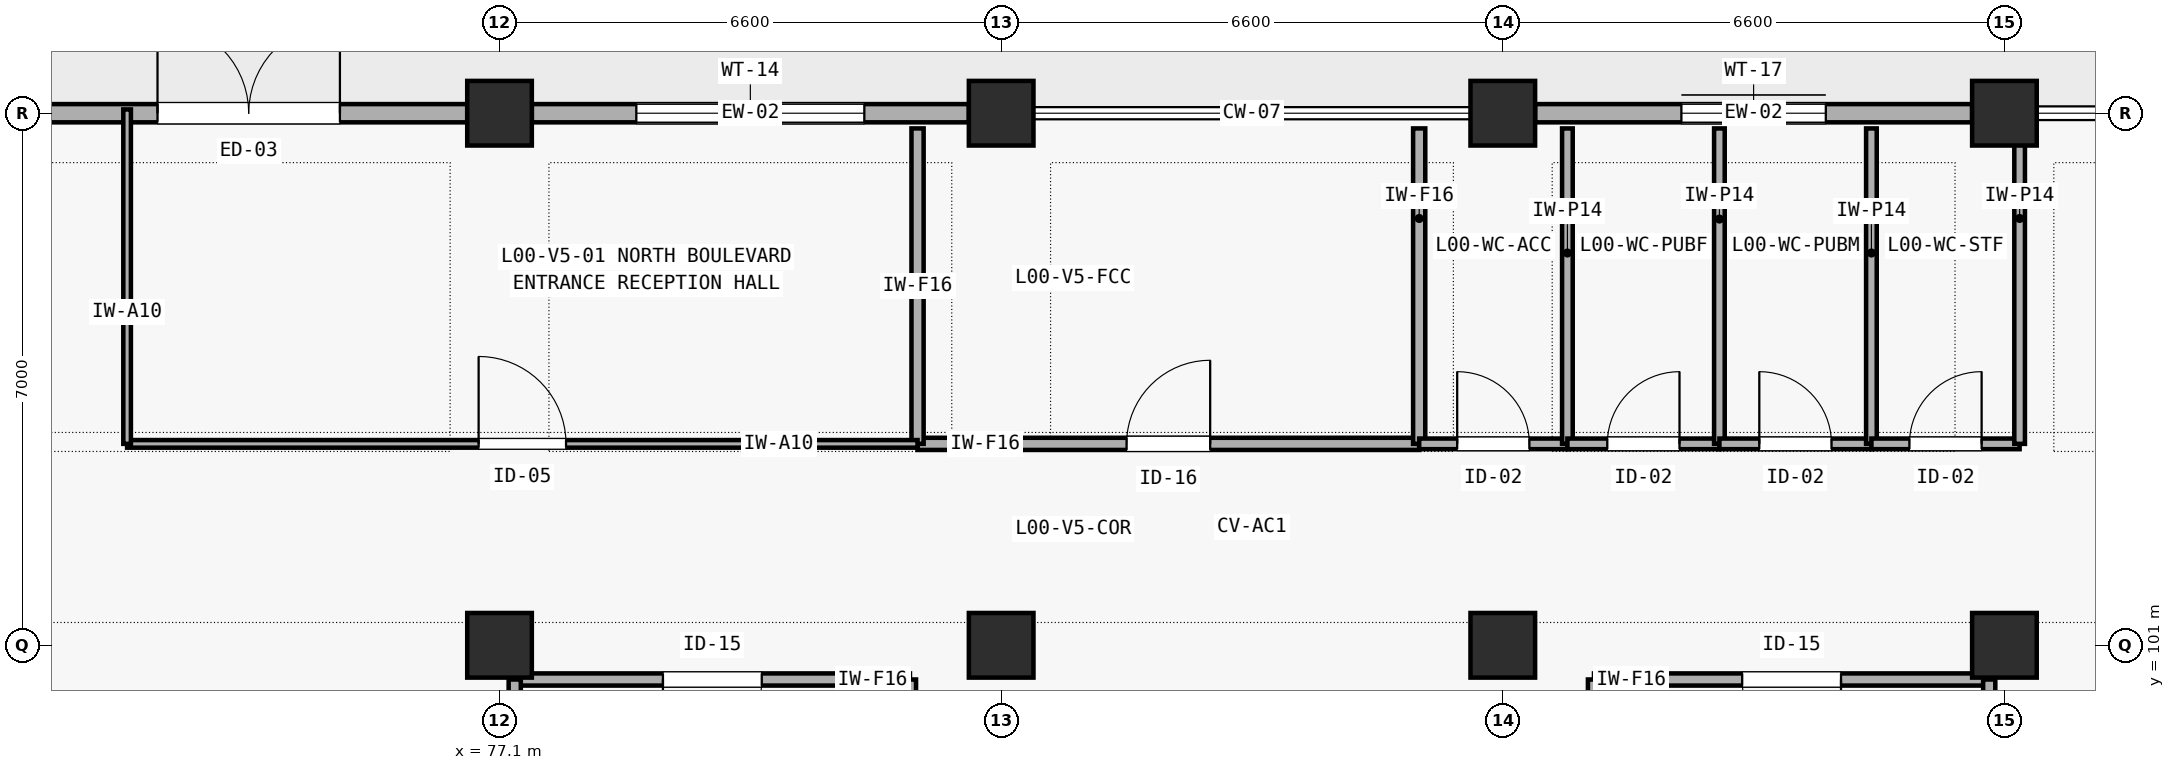
"""IFC4 building model, lengths in metres.
Left out: names, types, materials, properties, quantities, classifications, styles, units other than length and angle.
Written with IfcOpenShell. Run it as: python <this file> out.ifc"""

import sys

from ifc_helpers import new_model, si_unit, direction, frame, frame_2d, origin, origin_2d, place, context, subcontext, project, spatial, rectangle, extrude, element, fill, save


model = new_model("IFC4")
c1 = context("Model", 3, precision=1e-05, world=origin(), true_north=direction((0.0, 1.0)))
c2 = subcontext(c1, "Body", "Model", "MODEL_VIEW")
j1 = project(units=[si_unit("LENGTHUNIT", "METRE"), si_unit("PLANEANGLEUNIT", "RADIAN")], contexts=[c1])
p1 = place(None, origin())
s1 = spatial("IfcSite", under=j1, at=p1, CompositionType="ELEMENT")
p2 = place(p1, origin())
s2 = spatial("IfcBuilding", under=s1, at=p2, CompositionType="ELEMENT")
p3 = place(p2, origin())
s3 = spatial("IfcBuildingStorey", under=s2, at=p3, CompositionType="ELEMENT", Elevation=0.0)
for number, where, z_axis, x_axis in (
    (1, (77.1, 101.0, 0.0), (0.0, 0.0, 1.0), (1.0, 0.0, 0.0)),
    (2, (77.1, 108.0, 0.0), (0.0, 0.0, 1.0), (1.0, 0.0, 0.0)),
    (3, (83.7, 101.0, 0.0), (0.0, 0.0, 1.0), (1.0, 0.0, 0.0)),
    (4, (83.7, 108.0, 0.0), (0.0, 0.0, 1.0), (1.0, 0.0, 0.0)),
    (5, (90.3, 101.0, 0.0), (0.0, 0.0, 1.0), (1.0, 0.0, 0.0)),
    (6, (90.3, 108.0, 0.0), (0.0, 0.0, 1.0), (1.0, 0.0, 0.0)),
    (7, (96.9, 101.0, 0.0), (0.0, 0.0, 1.0), (1.0, 0.0, 0.0)),
    (8, (96.9, 108.0, 0.0), (0.0, 0.0, 1.0), (1.0, 0.0, 0.0)),
):
    element("IfcColumn", number, at=place(p3, frame(where, z_axis=z_axis, x_axis=x_axis)), inside=s3, PredefinedType="COLUMN", context=c2, shape_type="SweptSolid", body=[
        extrude(rectangle(XDim=0.85, YDim=0.85, at=origin_2d()), origin(), (0.0, 0.0, 1.0), 4.2),
    ])
p4 = place(p3, frame((70.925, 108.0, 0.0), z_axis=(0.0, 0.0, 1.0), x_axis=(1.0, 0.0, 0.0)))
e9 = element("IfcWall", 9, at=p4, inside=s3, PredefinedType="SOLIDWALL", context=c2, shape_type="SweptSolid", body=[
    extrude(rectangle(XDim=5.75, YDim=0.24, at=frame_2d((2.875, 0.0))), origin(), (0.0, 0.0, 1.0), 3.345),
])
p5 = place(p4, frame((1.675, 0.0, 0.0)))
e10 = element("IfcOpeningElement", 10, at=p5, cuts=e9, PredefinedType="OPENING", context=c2, shape_type="SweptSolid", body=[
    extrude(rectangle(XDim=2.4, YDim=2.25, at=frame_2d((1.2, 1.125))), frame((0.0, 0.13, 0.0), z_axis=(0.0, -1.0, 0.0), x_axis=(1.0, 0.0, 0.0)), (0.0, 0.0, 1.0), 0.26),
])
p6 = place(p3, frame((77.525, 108.0, 0.0), z_axis=(0.0, 0.0, 1.0), x_axis=(1.0, 0.0, 0.0)))
e11 = element("IfcWall", 11, at=p6, inside=s3, PredefinedType="SOLIDWALL", context=c2, shape_type="SweptSolid", body=[
    extrude(rectangle(XDim=5.75, YDim=0.24, at=frame_2d((2.875, 0.0))), origin(), (0.0, 0.0, 1.0), 3.135),
])
p7 = place(p6, frame((1.375, 0.0, 0.85)))
e12 = element("IfcOpeningElement", 12, at=p7, cuts=e11, PredefinedType="OPENING", context=c2, shape_type="SweptSolid", body=[
    extrude(rectangle(XDim=3.0, YDim=1.5, at=frame_2d((1.5, 0.75))), frame((0.0, 0.13, 0.0), z_axis=(0.0, -1.0, 0.0), x_axis=(1.0, 0.0, 0.0)), (0.0, 0.0, 1.0), 0.26),
])
p8 = place(p3, frame((90.725, 108.0, 0.0), z_axis=(0.0, 0.0, 1.0), x_axis=(1.0, 0.0, 0.0)))
e13 = element("IfcWall", 13, at=p8, inside=s3, PredefinedType="SOLIDWALL", context=c2, shape_type="SweptSolid", body=[
    extrude(rectangle(XDim=5.75, YDim=0.24, at=frame_2d((2.875, 0.0))), origin(), (0.0, 0.0, 1.0), 3.235),
])
p9 = place(p8, frame((1.925, 0.0, 0.85)))
e14 = element("IfcOpeningElement", 14, at=p9, cuts=e13, PredefinedType="OPENING", context=c2, shape_type="SweptSolid", body=[
    extrude(rectangle(XDim=1.9, YDim=1.25, at=frame_2d((0.95, 0.625))), frame((0.0, 0.13, 0.0), z_axis=(0.0, -1.0, 0.0), x_axis=(1.0, 0.0, 0.0)), (0.0, 0.0, 1.0), 0.26),
])
p10 = place(p3, frame((77.3, 100.55, 0.0), z_axis=(0.0, 0.0, 1.0), x_axis=(1.0, 0.0, 0.0)))
e15 = element("IfcWall", 15, at=p10, inside=s3, PredefinedType="SOLIDWALL", context=c2, shape_type="SweptSolid", body=[
    extrude(rectangle(XDim=5.2, YDim=0.16, at=frame_2d((2.6, 0.0))), origin(), (0.0, 0.0, 1.0), 3.9),
])
p11 = place(p10, frame((1.95, 0.0, 0.0)))
e16 = element("IfcOpeningElement", 16, at=p11, cuts=e15, PredefinedType="OPENING", context=c2, shape_type="SweptSolid", body=[
    extrude(rectangle(XDim=1.3, YDim=2.15, at=frame_2d((0.65, 1.075))), frame((0.0, 0.09, 0.0), z_axis=(0.0, -1.0, 0.0), x_axis=(1.0, 0.0, 0.0)), (0.0, 0.0, 1.0), 0.18),
])
p12 = place(p3, frame((77.3, 97.5, 0.0), z_axis=(0.0, 0.0, 1.0), x_axis=(0.0, 1.0, 0.0)))
e17 = element("IfcWall", 17, at=p12, inside=s3, PredefinedType="SOLIDWALL", context=c2, shape_type="SweptSolid", body=[
    extrude(rectangle(XDim=3.05, YDim=0.16, at=frame_2d((1.525, 0.0))), origin(), (0.0, 0.0, 1.0), 3.405),
])
p13 = place(p3, frame((82.5, 97.5, 0.0), z_axis=(0.0, 0.0, 1.0), x_axis=(0.0, 1.0, 0.0)))
e18 = element("IfcWall", 18, at=p13, inside=s3, PredefinedType="SOLIDWALL", context=c2, shape_type="SweptSolid", body=[
    extrude(rectangle(XDim=3.05, YDim=0.16, at=frame_2d((1.525, 0.0))), origin(), (0.0, 0.0, 1.0), 3.9),
])
p14 = place(p3, frame((91.5, 100.55, 0.0), z_axis=(0.0, 0.0, 1.0), x_axis=(1.0, 0.0, 0.0)))
e19 = element("IfcWall", 19, at=p14, inside=s3, PredefinedType="SOLIDWALL", context=c2, shape_type="SweptSolid", body=[
    extrude(rectangle(XDim=5.2, YDim=0.16, at=frame_2d((2.6, 0.0))), origin(), (0.0, 0.0, 1.0), 3.9),
])
p15 = place(p14, frame((1.95, 0.0, 0.0)))
e20 = element("IfcOpeningElement", 20, at=p15, cuts=e19, PredefinedType="OPENING", context=c2, shape_type="SweptSolid", body=[
    extrude(rectangle(XDim=1.3, YDim=2.15, at=frame_2d((0.65, 1.075))), frame((0.0, 0.09, 0.0), z_axis=(0.0, -1.0, 0.0), x_axis=(1.0, 0.0, 0.0)), (0.0, 0.0, 1.0), 0.18),
])
p16 = place(p3, frame((91.5, 97.5, 0.0), z_axis=(0.0, 0.0, 1.0), x_axis=(0.0, 1.0, 0.0)))
e21 = element("IfcWall", 21, at=p16, inside=s3, PredefinedType="SOLIDWALL", context=c2, shape_type="SweptSolid", body=[
    extrude(rectangle(XDim=3.05, YDim=0.16, at=frame_2d((1.525, 0.0))), origin(), (0.0, 0.0, 1.0), 3.9),
])
p17 = place(p3, frame((96.7, 97.5, 0.0), z_axis=(0.0, 0.0, 1.0), x_axis=(0.0, 1.0, 0.0)))
e22 = element("IfcWall", 22, at=p17, inside=s3, PredefinedType="SOLIDWALL", context=c2, shape_type="SweptSolid", body=[
    extrude(rectangle(XDim=3.05, YDim=0.16, at=frame_2d((1.525, 0.0))), origin(), (0.0, 0.0, 1.0), 3.405),
])
p18 = place(p3, frame((82.6, 103.65, 0.0), z_axis=(0.0, 0.0, 1.0), x_axis=(1.0, 0.0, 0.0)))
e23 = element("IfcWall", 23, at=p18, inside=s3, PredefinedType="SOLIDWALL", context=c2, shape_type="SweptSolid", body=[
    extrude(rectangle(XDim=6.6, YDim=0.16, at=frame_2d((3.3, 0.0))), origin(), (0.0, 0.0, 1.0), 3.9),
])
p19 = place(p18, frame((2.75, 0.0, 0.0)))
e24 = element("IfcOpeningElement", 24, at=p19, cuts=e23, PredefinedType="OPENING", context=c2, shape_type="SweptSolid", body=[
    extrude(rectangle(XDim=1.1, YDim=2.2, at=frame_2d((0.55, 1.1))), frame((0.0, 0.09, 0.0), z_axis=(0.0, -1.0, 0.0), x_axis=(1.0, 0.0, 0.0)), (0.0, 0.0, 1.0), 0.18),
])
for number, where, z_axis, x_axis in (
    (25, (82.6, 103.65, 0.0), (0.0, 0.0, 1.0), (0.0, 1.0, 0.0)),
    (26, (89.2, 103.65, 0.0), (0.0, 0.0, 1.0), (0.0, 1.0, 0.0)),
):
    element("IfcWall", number, at=place(p3, frame(where, z_axis=z_axis, x_axis=x_axis)), inside=s3, PredefinedType="SOLIDWALL", context=c2, shape_type="SweptSolid", body=[
        extrude(rectangle(XDim=4.15, YDim=0.16, at=frame_2d((2.075, 0.0))), origin(), (0.0, 0.0, 1.0), 3.9),
    ])
p20 = place(p3, frame((89.2, 103.65, 0.0), z_axis=(0.0, 0.0, 1.0), x_axis=(1.0, 0.0, 0.0)))
e27 = element("IfcWall", 27, at=p20, inside=s3, PredefinedType="PLUMBINGWALL", context=c2, shape_type="SweptSolid", body=[
    extrude(rectangle(XDim=1.95, YDim=0.14, at=frame_2d((0.975, 0.0))), origin(), (0.0, 0.0, 1.0), 3.9),
])
p21 = place(p20, frame((0.5, 0.0, 0.0)))
e28 = element("IfcOpeningElement", 28, at=p21, cuts=e27, PredefinedType="OPENING", context=c2, shape_type="SweptSolid", body=[
    extrude(rectangle(XDim=0.95, YDim=2.1, at=frame_2d((0.475, 1.05))), frame((0.0, 0.08, 0.0), z_axis=(0.0, -1.0, 0.0), x_axis=(1.0, 0.0, 0.0)), (0.0, 0.0, 1.0), 0.16),
])
p22 = place(p3, frame((91.15, 103.65, 0.0), z_axis=(0.0, 0.0, 1.0), x_axis=(0.0, 1.0, 0.0)))
e29 = element("IfcWall", 29, at=p22, inside=s3, PredefinedType="PLUMBINGWALL", context=c2, shape_type="SweptSolid", body=[
    extrude(rectangle(XDim=4.15, YDim=0.14, at=frame_2d((2.075, 0.0))), origin(), (0.0, 0.0, 1.0), 3.9),
])
p23 = place(p3, frame((91.15, 103.65, 0.0), z_axis=(0.0, 0.0, 1.0), x_axis=(1.0, 0.0, 0.0)))
e30 = element("IfcWall", 30, at=p23, inside=s3, PredefinedType="PLUMBINGWALL", context=c2, shape_type="SweptSolid", body=[
    extrude(rectangle(XDim=2.0, YDim=0.14, at=frame_2d((1.0, 0.0))), origin(), (0.0, 0.0, 1.0), 3.9),
])
p24 = place(p23, frame((0.525, 0.0, 0.0)))
e31 = element("IfcOpeningElement", 31, at=p24, cuts=e30, PredefinedType="OPENING", context=c2, shape_type="SweptSolid", body=[
    extrude(rectangle(XDim=0.95, YDim=2.1, at=frame_2d((0.475, 1.05))), frame((0.0, 0.08, 0.0), z_axis=(0.0, -1.0, 0.0), x_axis=(1.0, 0.0, 0.0)), (0.0, 0.0, 1.0), 0.16),
])
p25 = place(p3, frame((93.15, 103.65, 0.0), z_axis=(0.0, 0.0, 1.0), x_axis=(0.0, 1.0, 0.0)))
e32 = element("IfcWall", 32, at=p25, inside=s3, PredefinedType="PLUMBINGWALL", context=c2, shape_type="SweptSolid", body=[
    extrude(rectangle(XDim=4.15, YDim=0.14, at=frame_2d((2.075, 0.0))), origin(), (0.0, 0.0, 1.0), 3.9),
])
p26 = place(p3, frame((93.15, 103.65, 0.0), z_axis=(0.0, 0.0, 1.0), x_axis=(1.0, 0.0, 0.0)))
e33 = element("IfcWall", 33, at=p26, inside=s3, PredefinedType="PLUMBINGWALL", context=c2, shape_type="SweptSolid", body=[
    extrude(rectangle(XDim=2.0, YDim=0.14, at=frame_2d((1.0, 0.0))), origin(), (0.0, 0.0, 1.0), 3.9),
])
p27 = place(p26, frame((0.525, 0.0, 0.0)))
e34 = element("IfcOpeningElement", 34, at=p27, cuts=e33, PredefinedType="OPENING", context=c2, shape_type="SweptSolid", body=[
    extrude(rectangle(XDim=0.95, YDim=2.1, at=frame_2d((0.475, 1.05))), frame((0.0, 0.08, 0.0), z_axis=(0.0, -1.0, 0.0), x_axis=(1.0, 0.0, 0.0)), (0.0, 0.0, 1.0), 0.16),
])
p28 = place(p3, frame((95.15, 103.65, 0.0), z_axis=(0.0, 0.0, 1.0), x_axis=(0.0, 1.0, 0.0)))
e35 = element("IfcWall", 35, at=p28, inside=s3, PredefinedType="PLUMBINGWALL", context=c2, shape_type="SweptSolid", body=[
    extrude(rectangle(XDim=4.15, YDim=0.14, at=frame_2d((2.075, 0.0))), origin(), (0.0, 0.0, 1.0), 3.9),
])
p29 = place(p3, frame((95.15, 103.65, 0.0), z_axis=(0.0, 0.0, 1.0), x_axis=(1.0, 0.0, 0.0)))
e36 = element("IfcWall", 36, at=p29, inside=s3, PredefinedType="PLUMBINGWALL", context=c2, shape_type="SweptSolid", body=[
    extrude(rectangle(XDim=1.95, YDim=0.14, at=frame_2d((0.975, 0.0))), origin(), (0.0, 0.0, 1.0), 3.9),
])
p30 = place(p29, frame((0.5, 0.0, 0.0)))
e37 = element("IfcOpeningElement", 37, at=p30, cuts=e36, PredefinedType="OPENING", context=c2, shape_type="SweptSolid", body=[
    extrude(rectangle(XDim=0.95, YDim=2.1, at=frame_2d((0.475, 1.05))), frame((0.0, 0.08, 0.0), z_axis=(0.0, -1.0, 0.0), x_axis=(1.0, 0.0, 0.0)), (0.0, 0.0, 1.0), 0.16),
])
p31 = place(p3, frame((97.1, 103.65, 0.0), z_axis=(0.0, 0.0, 1.0), x_axis=(0.0, 1.0, 0.0)))
e38 = element("IfcWall", 38, at=p31, inside=s3, PredefinedType="PLUMBINGWALL", context=c2, shape_type="SweptSolid", body=[
    extrude(rectangle(XDim=4.15, YDim=0.14, at=frame_2d((2.075, 0.0))), origin(), (0.0, 0.0, 1.0), 3.505),
])
p32 = place(p3, frame((72.2, 103.65, 0.0), z_axis=(0.0, 0.0, 1.0), x_axis=(1.0, 0.0, 0.0)))
e39 = element("IfcWall", 39, at=p32, inside=s3, PredefinedType="PARTITIONING", context=c2, shape_type="SweptSolid", body=[
    extrude(rectangle(XDim=10.4, YDim=0.1, at=frame_2d((5.2, 0.0))), origin(), (0.0, 0.0, 1.0), 3.9),
])
p33 = place(p32, frame((4.625, 0.0, 0.0)))
e40 = element("IfcOpeningElement", 40, at=p33, cuts=e39, PredefinedType="OPENING", context=c2, shape_type="SweptSolid", body=[
    extrude(rectangle(XDim=1.15, YDim=2.15, at=frame_2d((0.575, 1.075))), frame((0.0, 0.06, 0.0), z_axis=(0.0, -1.0, 0.0), x_axis=(1.0, 0.0, 0.0)), (0.0, 0.0, 1.0), 0.12),
])
p34 = place(p3, frame((72.2, 103.65, 0.0), z_axis=(0.0, 0.0, 1.0), x_axis=(0.0, 1.0, 0.0)))
e41 = element("IfcWall", 41, at=p34, inside=s3, PredefinedType="PARTITIONING", context=c2, shape_type="SweptSolid", body=[
    extrude(rectangle(XDim=4.4, YDim=0.1, at=frame_2d((2.2, 0.0))), origin(), (0.0, 0.0, 1.0), 3.9),
])
p35 = place(p5, origin())
e42 = element("IfcDoor", 42, at=p35, inside=s3, OperationType="DOUBLE_DOOR_SINGLE_SWING", PredefinedType="DOOR", context=c2, shape_type="SweptSolid", body=[
    extrude(rectangle(XDim=2.4, YDim=2.25, at=frame_2d((1.2, 1.125))), frame((0.0, 0.025, 0.0), z_axis=(0.0, -1.0, 0.0), x_axis=(1.0, 0.0, 0.0)), (0.0, 0.0, 1.0), 0.05),
])
fill(e10, e42)
p36 = place(p7, origin())
e43 = element("IfcWindow", 43, at=p36, inside=s3, PartitioningType="SINGLE_PANEL", PredefinedType="WINDOW", context=c2, shape_type="SweptSolid", body=[
    extrude(rectangle(XDim=3.0, YDim=1.5, at=frame_2d((1.5, 0.75))), frame((0.0, 0.03, 0.0), z_axis=(0.0, -1.0, 0.0), x_axis=(1.0, 0.0, 0.0)), (0.0, 0.0, 1.0), 0.06),
])
fill(e12, e43)
p37 = place(p9, origin())
e44 = element("IfcWindow", 44, at=p37, inside=s3, PartitioningType="SINGLE_PANEL", PredefinedType="WINDOW", context=c2, shape_type="SweptSolid", body=[
    extrude(rectangle(XDim=1.9, YDim=1.25, at=frame_2d((0.95, 0.625))), frame((0.0, 0.03, 0.0), z_axis=(0.0, -1.0, 0.0), x_axis=(1.0, 0.0, 0.0)), (0.0, 0.0, 1.0), 0.06),
])
fill(e14, e44)
p38 = place(p11, frame((1.3, 0.0, 0.0), z_axis=(0.0, 0.0, 1.0), x_axis=(-1.0, 0.0, 0.0)))
e45 = element("IfcDoor", 45, at=p38, inside=s3, OperationType="SINGLE_SWING_RIGHT", PredefinedType="DOOR", context=c2, shape_type="SweptSolid", body=[
    extrude(rectangle(XDim=1.3, YDim=2.15, at=frame_2d((0.65, 1.075))), frame((0.0, 0.025, 0.0), z_axis=(0.0, -1.0, 0.0), x_axis=(1.0, 0.0, 0.0)), (0.0, 0.0, 1.0), 0.05),
])
fill(e16, e45)
p39 = place(p15, frame((1.3, 0.0, 0.0), z_axis=(0.0, 0.0, 1.0), x_axis=(-1.0, 0.0, 0.0)))
e46 = element("IfcDoor", 46, at=p39, inside=s3, OperationType="SINGLE_SWING_LEFT", PredefinedType="DOOR", context=c2, shape_type="SweptSolid", body=[
    extrude(rectangle(XDim=1.3, YDim=2.15, at=frame_2d((0.65, 1.075))), frame((0.0, 0.025, 0.0), z_axis=(0.0, -1.0, 0.0), x_axis=(1.0, 0.0, 0.0)), (0.0, 0.0, 1.0), 0.05),
])
fill(e20, e46)
p40 = place(p19, origin())
e47 = element("IfcDoor", 47, at=p40, inside=s3, OperationType="SINGLE_SWING_RIGHT", PredefinedType="DOOR", context=c2, shape_type="SweptSolid", body=[
    extrude(rectangle(XDim=1.1, YDim=2.2, at=frame_2d((0.55, 1.1))), frame((0.0, 0.025, 0.0), z_axis=(0.0, -1.0, 0.0), x_axis=(1.0, 0.0, 0.0)), (0.0, 0.0, 1.0), 0.05),
])
fill(e24, e47)
p41 = place(p21, origin())
e48 = element("IfcDoor", 48, at=p41, inside=s3, OperationType="SINGLE_SWING_LEFT", PredefinedType="DOOR", context=c2, shape_type="SweptSolid", body=[
    extrude(rectangle(XDim=0.95, YDim=2.1, at=frame_2d((0.475, 1.05))), frame((0.0, 0.025, 0.0), z_axis=(0.0, -1.0, 0.0), x_axis=(1.0, 0.0, 0.0)), (0.0, 0.0, 1.0), 0.05),
])
fill(e28, e48)
p42 = place(p24, origin())
e49 = element("IfcDoor", 49, at=p42, inside=s3, OperationType="SINGLE_SWING_RIGHT", PredefinedType="DOOR", context=c2, shape_type="SweptSolid", body=[
    extrude(rectangle(XDim=0.95, YDim=2.1, at=frame_2d((0.475, 1.05))), frame((0.0, 0.025, 0.0), z_axis=(0.0, -1.0, 0.0), x_axis=(1.0, 0.0, 0.0)), (0.0, 0.0, 1.0), 0.05),
])
fill(e31, e49)
p43 = place(p27, origin())
e50 = element("IfcDoor", 50, at=p43, inside=s3, OperationType="SINGLE_SWING_LEFT", PredefinedType="DOOR", context=c2, shape_type="SweptSolid", body=[
    extrude(rectangle(XDim=0.95, YDim=2.1, at=frame_2d((0.475, 1.05))), frame((0.0, 0.025, 0.0), z_axis=(0.0, -1.0, 0.0), x_axis=(1.0, 0.0, 0.0)), (0.0, 0.0, 1.0), 0.05),
])
fill(e34, e50)
p44 = place(p30, origin())
e51 = element("IfcDoor", 51, at=p44, inside=s3, OperationType="SINGLE_SWING_RIGHT", PredefinedType="DOOR", context=c2, shape_type="SweptSolid", body=[
    extrude(rectangle(XDim=0.95, YDim=2.1, at=frame_2d((0.475, 1.05))), frame((0.0, 0.025, 0.0), z_axis=(0.0, -1.0, 0.0), x_axis=(1.0, 0.0, 0.0)), (0.0, 0.0, 1.0), 0.05),
])
fill(e37, e51)
p45 = place(p33, origin())
e52 = element("IfcDoor", 52, at=p45, inside=s3, OperationType="SINGLE_SWING_LEFT", PredefinedType="DOOR", context=c2, shape_type="SweptSolid", body=[
    extrude(rectangle(XDim=1.15, YDim=2.15, at=frame_2d((0.575, 1.075))), frame((0.0, 0.025, 0.0), z_axis=(0.0, -1.0, 0.0), x_axis=(1.0, 0.0, 0.0)), (0.0, 0.0, 1.0), 0.05),
])
fill(e40, e52)
save(model, sys.argv[1])
